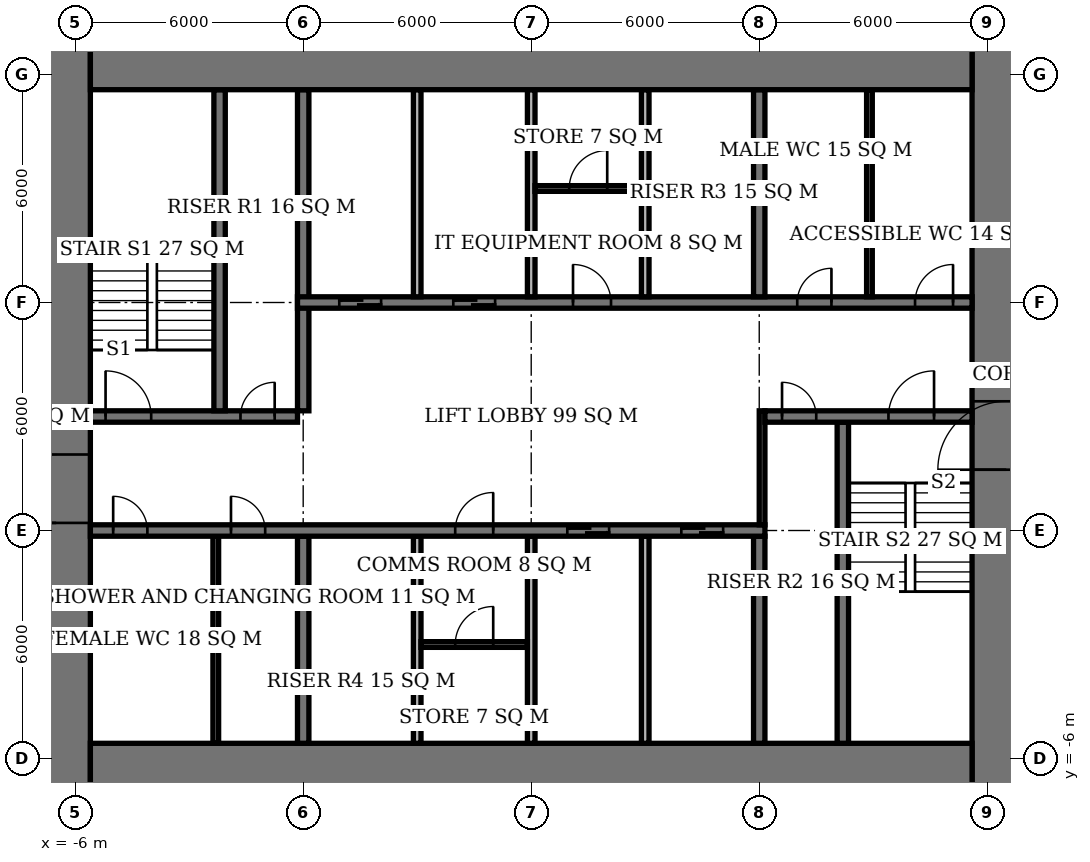
"""IFC4 building model, lengths in metres.
Left out: names, types, materials, properties, quantities, classifications, styles, units other than length and angle.
Written with IfcOpenShell. Run it as: python <this file> out.ifc"""

import sys

from ifc_helpers import new_model, si_unit, direction, frame, frame_2d, origin, place, context, subcontext, project, spatial, rectangle, extrude, element, fill, save


model = new_model("IFC4")
c1 = context("Model", 3, precision=1e-05, world=origin(), true_north=direction((0.0, 1.0)))
c2 = subcontext(c1, "Body", "Model", "MODEL_VIEW")
j1 = project(units=[si_unit("LENGTHUNIT", "METRE"), si_unit("PLANEANGLEUNIT", "RADIAN")], contexts=[c1])
p1 = place(None, origin())
s1 = spatial("IfcSite", under=j1, at=p1, CompositionType="ELEMENT")
p2 = place(p1, origin())
s2 = spatial("IfcBuilding", under=s1, at=p2, CompositionType="ELEMENT")
p3 = place(p2, frame((0.0, 0.0, 200.6)))
s3 = spatial("IfcBuildingStorey", under=s2, at=p3, CompositionType="ELEMENT", Elevation=200.6)
for number, where, z_axis, x_axis in (
    (1, (-5.6, -6.6, 0.0), (0.0, 0.0, 1.0), (1.0, 0.0, 0.0)),
    (2, (-5.6, 12.6, 0.0), (0.0, 0.0, 1.0), (1.0, 0.0, 0.0)),
):
    element("IfcWall", number, at=place(p3, frame(where, z_axis=z_axis, x_axis=x_axis)), inside=s3, PredefinedType="SHEAR", context=c2, shape_type="SweptSolid", body=[
        extrude(rectangle(XDim=23.2, YDim=2.0, at=frame_2d((11.6, 0.0))), origin(), (0.0, 0.0, 1.0), 3.9),
    ])
p4 = place(p3, frame((-6.5, -7.6, 0.0), z_axis=(0.0, 0.0, 1.0), x_axis=(0.0, 1.0, 0.0)))
e3 = element("IfcWall", 3, at=p4, inside=s3, PredefinedType="SHEAR", context=c2, shape_type="SweptSolid", body=[
    extrude(rectangle(XDim=21.2, YDim=1.8, at=frame_2d((10.6, 0.0))), origin(), (0.0, 0.0, 1.0), 3.9),
])
p5 = place(p4, frame((7.8, 0.0, 0.0)))
e4 = element("IfcOpeningElement", 4, at=p5, cuts=e3, PredefinedType="OPENING", context=c2, shape_type="SweptSolid", body=[
    extrude(rectangle(XDim=1.8, YDim=2.4, at=frame_2d((0.9, 1.2))), frame((0.0, 0.91, 0.0), z_axis=(0.0, -1.0, 0.0), x_axis=(1.0, 0.0, 0.0)), (0.0, 0.0, 1.0), 1.82),
])
p6 = place(p3, frame((18.5, -7.6, 0.0), z_axis=(0.0, 0.0, 1.0), x_axis=(0.0, 1.0, 0.0)))
e5 = element("IfcWall", 5, at=p6, inside=s3, PredefinedType="SHEAR", context=c2, shape_type="SweptSolid", body=[
    extrude(rectangle(XDim=21.2, YDim=1.8, at=frame_2d((10.6, 0.0))), origin(), (0.0, 0.0, 1.0), 3.9),
])
p7 = place(p6, frame((9.2, 0.0, 0.0)))
e6 = element("IfcOpeningElement", 6, at=p7, cuts=e5, PredefinedType="OPENING", context=c2, shape_type="SweptSolid", body=[
    extrude(rectangle(XDim=1.8, YDim=2.4, at=frame_2d((0.9, 1.2))), frame((0.0, 0.91, 0.0), z_axis=(0.0, -1.0, 0.0), x_axis=(1.0, 0.0, 0.0)), (0.0, 0.0, 1.0), 1.82),
])
p8 = place(p3, frame((-5.6, 0.0, 0.0), z_axis=(0.0, 0.0, 1.0), x_axis=(1.0, 0.0, 0.0)))
e7 = element("IfcWall", 7, at=p8, inside=s3, PredefinedType="SHEAR", context=c2, shape_type="SweptSolid", body=[
    extrude(rectangle(XDim=17.75, YDim=0.3, at=frame_2d((8.875, 0.0))), origin(), (0.0, 0.0, 1.0), 3.9),
])
p9 = place(p8, frame((0.6, 0.0, 0.0)))
e8 = element("IfcOpeningElement", 8, at=p9, cuts=e7, PredefinedType="OPENING", context=c2, shape_type="SweptSolid", body=[
    extrude(rectangle(XDim=0.9, YDim=2.1, at=frame_2d((0.45, 1.05))), frame((0.0, 0.16, 0.0), z_axis=(0.0, -1.0, 0.0), x_axis=(1.0, 0.0, 0.0)), (0.0, 0.0, 1.0), 0.32),
])
p10 = place(p8, frame((3.7, 0.0, 0.0)))
e9 = element("IfcOpeningElement", 9, at=p10, cuts=e7, PredefinedType="OPENING", context=c2, shape_type="SweptSolid", body=[
    extrude(rectangle(XDim=0.9, YDim=2.1, at=frame_2d((0.45, 1.05))), frame((0.0, 0.16, 0.0), z_axis=(0.0, -1.0, 0.0), x_axis=(1.0, 0.0, 0.0)), (0.0, 0.0, 1.0), 0.32),
])
p11 = place(p8, frame((9.6, 0.0, 0.0)))
e10 = element("IfcOpeningElement", 10, at=p11, cuts=e7, PredefinedType="OPENING", context=c2, shape_type="SweptSolid", body=[
    extrude(rectangle(XDim=1.0, YDim=2.1, at=frame_2d((0.5, 1.05))), frame((0.0, 0.16, 0.0), z_axis=(0.0, -1.0, 0.0), x_axis=(1.0, 0.0, 0.0)), (0.0, 0.0, 1.0), 0.32),
])
p12 = place(p8, frame((12.55, 0.0, 0.0)))
e11 = element("IfcOpeningElement", 11, at=p12, cuts=e7, PredefinedType="OPENING", context=c2, shape_type="SweptSolid", body=[
    extrude(rectangle(XDim=1.1, YDim=2.1, at=frame_2d((0.55, 1.05))), frame((0.0, 0.16, 0.0), z_axis=(0.0, -1.0, 0.0), x_axis=(1.0, 0.0, 0.0)), (0.0, 0.0, 1.0), 0.32),
])
p13 = place(p8, frame((15.55, 0.0, 0.0)))
e12 = element("IfcOpeningElement", 12, at=p13, cuts=e7, PredefinedType="OPENING", context=c2, shape_type="SweptSolid", body=[
    extrude(rectangle(XDim=1.1, YDim=2.1, at=frame_2d((0.55, 1.05))), frame((0.0, 0.16, 0.0), z_axis=(0.0, -1.0, 0.0), x_axis=(1.0, 0.0, 0.0)), (0.0, 0.0, 1.0), 0.32),
])
p14 = place(p3, frame((-5.6, 3.0, 0.0), z_axis=(0.0, 0.0, 1.0), x_axis=(1.0, 0.0, 0.0)))
e13 = element("IfcWall", 13, at=p14, inside=s3, PredefinedType="SHEAR", context=c2, shape_type="SweptSolid", body=[
    extrude(rectangle(XDim=5.45, YDim=0.3, at=frame_2d((2.725, 0.0))), origin(), (0.0, 0.0, 1.0), 3.9),
])
p15 = place(p14, frame((0.4, 0.0, 0.0)))
e14 = element("IfcOpeningElement", 14, at=p15, cuts=e13, PredefinedType="OPENING", context=c2, shape_type="SweptSolid", body=[
    extrude(rectangle(XDim=1.2, YDim=2.1, at=frame_2d((0.6, 1.05))), frame((0.0, 0.16, 0.0), z_axis=(0.0, -1.0, 0.0), x_axis=(1.0, 0.0, 0.0)), (0.0, 0.0, 1.0), 0.32),
])
p16 = place(p14, frame((3.95, 0.0, 0.0)))
e15 = element("IfcOpeningElement", 15, at=p16, cuts=e13, PredefinedType="OPENING", context=c2, shape_type="SweptSolid", body=[
    extrude(rectangle(XDim=0.9, YDim=2.1, at=frame_2d((0.45, 1.05))), frame((0.0, 0.16, 0.0), z_axis=(0.0, -1.0, 0.0), x_axis=(1.0, 0.0, 0.0)), (0.0, 0.0, 1.0), 0.32),
])
p17 = place(p3, frame((12.15, 3.0, 0.0), z_axis=(0.0, 0.0, 1.0), x_axis=(1.0, 0.0, 0.0)))
e16 = element("IfcWall", 16, at=p17, inside=s3, PredefinedType="SHEAR", context=c2, shape_type="SweptSolid", body=[
    extrude(rectangle(XDim=5.45, YDim=0.3, at=frame_2d((2.725, 0.0))), origin(), (0.0, 0.0, 1.0), 3.9),
])
p18 = place(p17, frame((3.25, 0.0, 0.0)))
e17 = element("IfcOpeningElement", 17, at=p18, cuts=e16, PredefinedType="OPENING", context=c2, shape_type="SweptSolid", body=[
    extrude(rectangle(XDim=1.2, YDim=2.1, at=frame_2d((0.6, 1.05))), frame((0.0, 0.16, 0.0), z_axis=(0.0, -1.0, 0.0), x_axis=(1.0, 0.0, 0.0)), (0.0, 0.0, 1.0), 0.32),
])
p19 = place(p17, frame((0.45, 0.0, 0.0)))
e18 = element("IfcOpeningElement", 18, at=p19, cuts=e16, PredefinedType="OPENING", context=c2, shape_type="SweptSolid", body=[
    extrude(rectangle(XDim=0.9, YDim=2.1, at=frame_2d((0.45, 1.05))), frame((0.0, 0.16, 0.0), z_axis=(0.0, -1.0, 0.0), x_axis=(1.0, 0.0, 0.0)), (0.0, 0.0, 1.0), 0.32),
])
p20 = place(p3, frame((-0.15, 6.0, 0.0), z_axis=(0.0, 0.0, 1.0), x_axis=(1.0, 0.0, 0.0)))
e19 = element("IfcWall", 19, at=p20, inside=s3, PredefinedType="SHEAR", context=c2, shape_type="SweptSolid", body=[
    extrude(rectangle(XDim=17.75, YDim=0.3, at=frame_2d((8.875, 0.0))), origin(), (0.0, 0.0, 1.0), 3.9),
])
p21 = place(p20, frame((13.15, 0.0, 0.0)))
e20 = element("IfcOpeningElement", 20, at=p21, cuts=e19, PredefinedType="OPENING", context=c2, shape_type="SweptSolid", body=[
    extrude(rectangle(XDim=0.9, YDim=2.1, at=frame_2d((0.45, 1.05))), frame((0.0, 0.16, 0.0), z_axis=(0.0, -1.0, 0.0), x_axis=(1.0, 0.0, 0.0)), (0.0, 0.0, 1.0), 0.32),
])
p22 = place(p20, frame((16.25, 0.0, 0.0)))
e21 = element("IfcOpeningElement", 21, at=p22, cuts=e19, PredefinedType="OPENING", context=c2, shape_type="SweptSolid", body=[
    extrude(rectangle(XDim=1.0, YDim=2.1, at=frame_2d((0.5, 1.05))), frame((0.0, 0.16, 0.0), z_axis=(0.0, -1.0, 0.0), x_axis=(1.0, 0.0, 0.0)), (0.0, 0.0, 1.0), 0.32),
])
p23 = place(p20, frame((7.25, 0.0, 0.0)))
e22 = element("IfcOpeningElement", 22, at=p23, cuts=e19, PredefinedType="OPENING", context=c2, shape_type="SweptSolid", body=[
    extrude(rectangle(XDim=1.0, YDim=2.1, at=frame_2d((0.5, 1.05))), frame((0.0, 0.16, 0.0), z_axis=(0.0, -1.0, 0.0), x_axis=(1.0, 0.0, 0.0)), (0.0, 0.0, 1.0), 0.32),
])
p24 = place(p20, frame((1.1, 0.0, 0.0)))
e23 = element("IfcOpeningElement", 23, at=p24, cuts=e19, PredefinedType="OPENING", context=c2, shape_type="SweptSolid", body=[
    extrude(rectangle(XDim=1.1, YDim=2.1, at=frame_2d((0.55, 1.05))), frame((0.0, 0.16, 0.0), z_axis=(0.0, -1.0, 0.0), x_axis=(1.0, 0.0, 0.0)), (0.0, 0.0, 1.0), 0.32),
])
p25 = place(p20, frame((4.1, 0.0, 0.0)))
e24 = element("IfcOpeningElement", 24, at=p25, cuts=e19, PredefinedType="OPENING", context=c2, shape_type="SweptSolid", body=[
    extrude(rectangle(XDim=1.1, YDim=2.1, at=frame_2d((0.55, 1.05))), frame((0.0, 0.16, 0.0), z_axis=(0.0, -1.0, 0.0), x_axis=(1.0, 0.0, 0.0)), (0.0, 0.0, 1.0), 0.32),
])
p26 = place(p3, frame((0.0, -5.6, 0.0), z_axis=(0.0, 0.0, 1.0), x_axis=(0.0, 1.0, 0.0)))
e25 = element("IfcWall", 25, at=p26, inside=s3, PredefinedType="SHEAR", context=c2, shape_type="SweptSolid", body=[
    extrude(rectangle(XDim=5.45, YDim=0.3, at=frame_2d((2.725, 0.0))), origin(), (0.0, 0.0, 1.0), 3.9),
])
p27 = place(p3, frame((0.0, 3.15, 0.0), z_axis=(0.0, 0.0, 1.0), x_axis=(0.0, 1.0, 0.0)))
e26 = element("IfcWall", 26, at=p27, inside=s3, PredefinedType="SHEAR", context=c2, shape_type="SweptSolid", body=[
    extrude(rectangle(XDim=8.45, YDim=0.3, at=frame_2d((4.225, 0.0))), origin(), (0.0, 0.0, 1.0), 3.9),
])
for number, where, z_axis, x_axis in (
    (27, (12.0, -5.6, 0.0), (0.0, 0.0, 1.0), (0.0, 1.0, 0.0)),
    (28, (12.0, 6.15, 0.0), (0.0, 0.0, 1.0), (0.0, 1.0, 0.0)),
):
    element("IfcWall", number, at=place(p3, frame(where, z_axis=z_axis, x_axis=x_axis)), inside=s3, PredefinedType="SHEAR", context=c2, shape_type="SweptSolid", body=[
        extrude(rectangle(XDim=5.45, YDim=0.3, at=frame_2d((2.725, 0.0))), origin(), (0.0, 0.0, 1.0), 3.9),
    ])
for number, where, z_axis, x_axis in (
    (29, (-2.2, 3.15, 0.0), (0.0, 0.0, 1.0), (0.0, 1.0, 0.0)),
    (30, (14.2, -5.6, 0.0), (0.0, 0.0, 1.0), (0.0, 1.0, 0.0)),
):
    element("IfcWall", number, at=place(p3, frame(where, z_axis=z_axis, x_axis=x_axis)), inside=s3, PredefinedType="SHEAR", context=c2, shape_type="SweptSolid", body=[
        extrude(rectangle(XDim=8.45, YDim=0.3, at=frame_2d((4.225, 0.0))), origin(), (0.0, 0.0, 1.0), 3.9),
    ])
for number, where, z_axis, x_axis in (
    (31, (3.0, 6.15, 0.0), (0.0, 0.0, 1.0), (0.0, 1.0, 0.0)),
    (32, (6.0, 6.15, 0.0), (0.0, 0.0, 1.0), (0.0, 1.0, 0.0)),
    (33, (9.0, 6.15, 0.0), (0.0, 0.0, 1.0), (0.0, 1.0, 0.0)),
    (34, (3.0, -5.6, 0.0), (0.0, 0.0, 1.0), (0.0, 1.0, 0.0)),
    (35, (6.0, -5.6, 0.0), (0.0, 0.0, 1.0), (0.0, 1.0, 0.0)),
    (36, (9.0, -5.6, 0.0), (0.0, 0.0, 1.0), (0.0, 1.0, 0.0)),
):
    element("IfcWall", number, at=place(p3, frame(where, z_axis=z_axis, x_axis=x_axis)), inside=s3, PredefinedType="SOLIDWALL", context=c2, shape_type="SweptSolid", body=[
        extrude(rectangle(XDim=5.45, YDim=0.2, at=frame_2d((2.725, 0.0))), origin(), (0.0, 0.0, 1.0), 3.9),
    ])
for number, where, z_axis, x_axis in (
    (37, (-2.3, -5.6, 0.0), (0.0, 0.0, 1.0), (0.0, 1.0, 0.0)),
    (38, (14.9, 6.15, 0.0), (0.0, 0.0, 1.0), (0.0, 1.0, 0.0)),
):
    element("IfcWall", number, at=place(p3, frame(where, z_axis=z_axis, x_axis=x_axis)), inside=s3, PredefinedType="PLUMBINGWALL", context=c2, shape_type="SweptSolid", body=[
        extrude(rectangle(XDim=5.45, YDim=0.15, at=frame_2d((2.725, 0.0))), origin(), (0.0, 0.0, 1.0), 3.65),
    ])
p28 = place(p3, frame((6.1, 9.0, 0.0), z_axis=(0.0, 0.0, 1.0), x_axis=(1.0, 0.0, 0.0)))
e39 = element("IfcWall", 39, at=p28, inside=s3, PredefinedType="PARTITIONING", context=c2, shape_type="SweptSolid", body=[
    extrude(rectangle(XDim=2.8, YDim=0.15, at=frame_2d((1.4, 0.0))), origin(), (0.0, 0.0, 1.0), 3.65),
])
p29 = place(p28, frame((0.9, 0.0, 0.0)))
e40 = element("IfcOpeningElement", 40, at=p29, cuts=e39, PredefinedType="OPENING", context=c2, shape_type="SweptSolid", body=[
    extrude(rectangle(XDim=1.0, YDim=2.1, at=frame_2d((0.5, 1.05))), frame((0.0, 0.085, 0.0), z_axis=(0.0, -1.0, 0.0), x_axis=(1.0, 0.0, 0.0)), (0.0, 0.0, 1.0), 0.17),
])
p30 = place(p3, frame((3.1, -3.0, 0.0), z_axis=(0.0, 0.0, 1.0), x_axis=(1.0, 0.0, 0.0)))
e41 = element("IfcWall", 41, at=p30, inside=s3, PredefinedType="PARTITIONING", context=c2, shape_type="SweptSolid", body=[
    extrude(rectangle(XDim=2.8, YDim=0.15, at=frame_2d((1.4, 0.0))), origin(), (0.0, 0.0, 1.0), 3.65),
])
p31 = place(p30, frame((0.9, 0.0, 0.0)))
e42 = element("IfcOpeningElement", 42, at=p31, cuts=e41, PredefinedType="OPENING", context=c2, shape_type="SweptSolid", body=[
    extrude(rectangle(XDim=1.0, YDim=2.1, at=frame_2d((0.5, 1.05))), frame((0.0, 0.085, 0.0), z_axis=(0.0, -1.0, 0.0), x_axis=(1.0, 0.0, 0.0)), (0.0, 0.0, 1.0), 0.17),
])
p32 = place(p3, frame((12.075, 0.15, 0.0), z_axis=(0.0, 0.0, 1.0), x_axis=(0.0, 1.0, 0.0)))
e43 = element("IfcWall", 43, at=p32, inside=s3, PredefinedType="PARTITIONING", context=c2, shape_type="SweptSolid", body=[
    extrude(rectangle(XDim=3.0, YDim=0.15, at=frame_2d((1.5, 0.0))), origin(), (0.0, 0.0, 1.0), 3.65),
])
p33 = place(p5, origin())
e44 = element("IfcDoor", 44, at=p33, inside=s3, OperationType="DOUBLE_DOOR_SINGLE_SWING", PredefinedType="DOOR", context=c2, shape_type="SweptSolid", body=[
    extrude(rectangle(XDim=1.8, YDim=2.4, at=frame_2d((0.9, 1.2))), frame((0.0, 0.025, 0.0), z_axis=(0.0, -1.0, 0.0), x_axis=(1.0, 0.0, 0.0)), (0.0, 0.0, 1.0), 0.05),
])
fill(e4, e44)
p34 = place(p7, origin())
e45 = element("IfcDoor", 45, at=p34, inside=s3, OperationType="DOUBLE_DOOR_SINGLE_SWING", PredefinedType="DOOR", context=c2, shape_type="SweptSolid", body=[
    extrude(rectangle(XDim=1.8, YDim=2.4, at=frame_2d((0.9, 1.2))), frame((0.0, 0.025, 0.0), z_axis=(0.0, -1.0, 0.0), x_axis=(1.0, 0.0, 0.0)), (0.0, 0.0, 1.0), 0.05),
])
fill(e6, e45)
p35 = place(p15, origin())
e46 = element("IfcDoor", 46, at=p35, inside=s3, OperationType="SINGLE_SWING_LEFT", PredefinedType="DOOR", context=c2, shape_type="SweptSolid", body=[
    extrude(rectangle(XDim=1.2, YDim=2.1, at=frame_2d((0.6, 1.05))), frame((0.0, 0.025, 0.0), z_axis=(0.0, -1.0, 0.0), x_axis=(1.0, 0.0, 0.0)), (0.0, 0.0, 1.0), 0.05),
])
fill(e14, e46)
p36 = place(p16, origin())
e47 = element("IfcDoor", 47, at=p36, inside=s3, OperationType="SINGLE_SWING_RIGHT", PredefinedType="DOOR", context=c2, shape_type="SweptSolid", body=[
    extrude(rectangle(XDim=0.9, YDim=2.1, at=frame_2d((0.45, 1.05))), frame((0.0, 0.025, 0.0), z_axis=(0.0, -1.0, 0.0), x_axis=(1.0, 0.0, 0.0)), (0.0, 0.0, 1.0), 0.05),
])
fill(e15, e47)
p37 = place(p18, origin())
e48 = element("IfcDoor", 48, at=p37, inside=s3, OperationType="SINGLE_SWING_RIGHT", PredefinedType="DOOR", context=c2, shape_type="SweptSolid", body=[
    extrude(rectangle(XDim=1.2, YDim=2.1, at=frame_2d((0.6, 1.05))), frame((0.0, 0.025, 0.0), z_axis=(0.0, -1.0, 0.0), x_axis=(1.0, 0.0, 0.0)), (0.0, 0.0, 1.0), 0.05),
])
fill(e17, e48)
p38 = place(p19, origin())
e49 = element("IfcDoor", 49, at=p38, inside=s3, OperationType="SINGLE_SWING_LEFT", PredefinedType="DOOR", context=c2, shape_type="SweptSolid", body=[
    extrude(rectangle(XDim=0.9, YDim=2.1, at=frame_2d((0.45, 1.05))), frame((0.0, 0.025, 0.0), z_axis=(0.0, -1.0, 0.0), x_axis=(1.0, 0.0, 0.0)), (0.0, 0.0, 1.0), 0.05),
])
fill(e18, e49)
p39 = place(p9, origin())
e50 = element("IfcDoor", 50, at=p39, inside=s3, OperationType="SINGLE_SWING_LEFT", PredefinedType="DOOR", context=c2, shape_type="SweptSolid", body=[
    extrude(rectangle(XDim=0.9, YDim=2.1, at=frame_2d((0.45, 1.05))), frame((0.0, 0.025, 0.0), z_axis=(0.0, -1.0, 0.0), x_axis=(1.0, 0.0, 0.0)), (0.0, 0.0, 1.0), 0.05),
])
fill(e8, e50)
p40 = place(p10, origin())
e51 = element("IfcDoor", 51, at=p40, inside=s3, OperationType="SINGLE_SWING_LEFT", PredefinedType="DOOR", context=c2, shape_type="SweptSolid", body=[
    extrude(rectangle(XDim=0.9, YDim=2.1, at=frame_2d((0.45, 1.05))), frame((0.0, 0.025, 0.0), z_axis=(0.0, -1.0, 0.0), x_axis=(1.0, 0.0, 0.0)), (0.0, 0.0, 1.0), 0.05),
])
fill(e9, e51)
p41 = place(p21, origin())
e52 = element("IfcDoor", 52, at=p41, inside=s3, OperationType="SINGLE_SWING_RIGHT", PredefinedType="DOOR", context=c2, shape_type="SweptSolid", body=[
    extrude(rectangle(XDim=0.9, YDim=2.1, at=frame_2d((0.45, 1.05))), frame((0.0, 0.025, 0.0), z_axis=(0.0, -1.0, 0.0), x_axis=(1.0, 0.0, 0.0)), (0.0, 0.0, 1.0), 0.05),
])
fill(e20, e52)
p42 = place(p22, origin())
e53 = element("IfcDoor", 53, at=p42, inside=s3, OperationType="SINGLE_SWING_RIGHT", PredefinedType="DOOR", context=c2, shape_type="SweptSolid", body=[
    extrude(rectangle(XDim=1.0, YDim=2.1, at=frame_2d((0.5, 1.05))), frame((0.0, 0.025, 0.0), z_axis=(0.0, -1.0, 0.0), x_axis=(1.0, 0.0, 0.0)), (0.0, 0.0, 1.0), 0.05),
])
fill(e21, e53)
p43 = place(p29, origin())
e54 = element("IfcDoor", 54, at=p43, inside=s3, OperationType="SINGLE_SWING_RIGHT", PredefinedType="DOOR", context=c2, shape_type="SweptSolid", body=[
    extrude(rectangle(XDim=1.0, YDim=2.1, at=frame_2d((0.5, 1.05))), frame((0.0, 0.025, 0.0), z_axis=(0.0, -1.0, 0.0), x_axis=(1.0, 0.0, 0.0)), (0.0, 0.0, 1.0), 0.05),
])
fill(e40, e54)
p44 = place(p23, origin())
e55 = element("IfcDoor", 55, at=p44, inside=s3, OperationType="SINGLE_SWING_LEFT", PredefinedType="DOOR", context=c2, shape_type="SweptSolid", body=[
    extrude(rectangle(XDim=1.0, YDim=2.1, at=frame_2d((0.5, 1.05))), frame((0.0, 0.025, 0.0), z_axis=(0.0, -1.0, 0.0), x_axis=(1.0, 0.0, 0.0)), (0.0, 0.0, 1.0), 0.05),
])
fill(e22, e55)
p45 = place(p31, origin())
e56 = element("IfcDoor", 56, at=p45, inside=s3, OperationType="SINGLE_SWING_RIGHT", PredefinedType="DOOR", context=c2, shape_type="SweptSolid", body=[
    extrude(rectangle(XDim=1.0, YDim=2.1, at=frame_2d((0.5, 1.05))), frame((0.0, 0.025, 0.0), z_axis=(0.0, -1.0, 0.0), x_axis=(1.0, 0.0, 0.0)), (0.0, 0.0, 1.0), 0.05),
])
fill(e42, e56)
p46 = place(p11, origin())
e57 = element("IfcDoor", 57, at=p46, inside=s3, OperationType="SINGLE_SWING_RIGHT", PredefinedType="DOOR", context=c2, shape_type="SweptSolid", body=[
    extrude(rectangle(XDim=1.0, YDim=2.1, at=frame_2d((0.5, 1.05))), frame((0.0, 0.025, 0.0), z_axis=(0.0, -1.0, 0.0), x_axis=(1.0, 0.0, 0.0)), (0.0, 0.0, 1.0), 0.05),
])
fill(e10, e57)
p47 = place(p24, origin())
e58 = element("IfcDoor", 58, at=p47, inside=s3, OperationType="DOUBLE_DOOR_SLIDING", PredefinedType="USERDEFINED", context=c2, shape_type="SweptSolid", body=[
    extrude(rectangle(XDim=1.1, YDim=2.1, at=frame_2d((0.55, 1.05))), frame((0.0, 0.025, 0.0), z_axis=(0.0, -1.0, 0.0), x_axis=(1.0, 0.0, 0.0)), (0.0, 0.0, 1.0), 0.05),
])
fill(e23, e58)
p48 = place(p25, origin())
e59 = element("IfcDoor", 59, at=p48, inside=s3, OperationType="DOUBLE_DOOR_SLIDING", PredefinedType="USERDEFINED", context=c2, shape_type="SweptSolid", body=[
    extrude(rectangle(XDim=1.1, YDim=2.1, at=frame_2d((0.55, 1.05))), frame((0.0, 0.025, 0.0), z_axis=(0.0, -1.0, 0.0), x_axis=(1.0, 0.0, 0.0)), (0.0, 0.0, 1.0), 0.05),
])
fill(e24, e59)
p49 = place(p12, origin())
e60 = element("IfcDoor", 60, at=p49, inside=s3, OperationType="DOUBLE_DOOR_SLIDING", PredefinedType="USERDEFINED", context=c2, shape_type="SweptSolid", body=[
    extrude(rectangle(XDim=1.1, YDim=2.1, at=frame_2d((0.55, 1.05))), frame((0.0, 0.025, 0.0), z_axis=(0.0, -1.0, 0.0), x_axis=(1.0, 0.0, 0.0)), (0.0, 0.0, 1.0), 0.05),
])
fill(e11, e60)
p50 = place(p13, origin())
e61 = element("IfcDoor", 61, at=p50, inside=s3, OperationType="DOUBLE_DOOR_SLIDING", PredefinedType="USERDEFINED", context=c2, shape_type="SweptSolid", body=[
    extrude(rectangle(XDim=1.1, YDim=2.1, at=frame_2d((0.55, 1.05))), frame((0.0, 0.025, 0.0), z_axis=(0.0, -1.0, 0.0), x_axis=(1.0, 0.0, 0.0)), (0.0, 0.0, 1.0), 0.05),
])
fill(e12, e61)
save(model, sys.argv[1])
